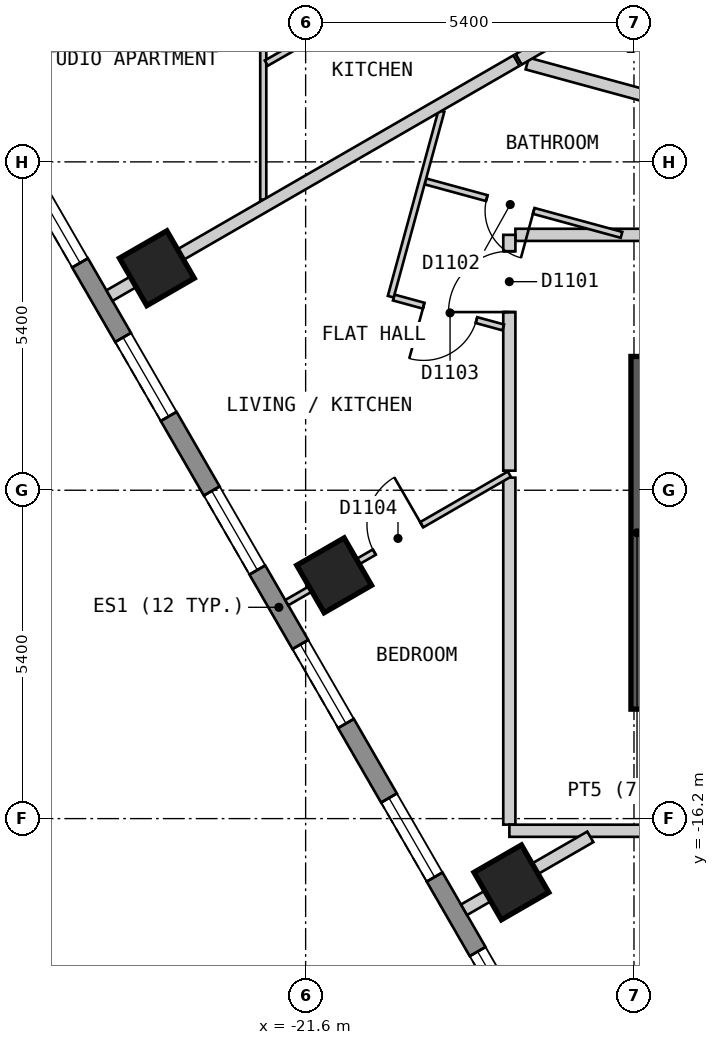
"""IFC4 building model, lengths in metres.
Left out: names, types, materials, properties, quantities, classifications, styles, units other than length and angle.
Written with IfcOpenShell. Run it as: python <this file> out.ifc"""

import sys

from ifc_helpers import new_model, si_unit, direction, frame, frame_2d, origin, origin_2d, place, context, subcontext, project, spatial, polyline, rectangle, outline, extrude, element, fill, save


model = new_model("IFC4")
c1 = context("Model", 3, precision=1e-05, world=origin(), true_north=direction((0.0, 1.0)))
c2 = subcontext(c1, "Body", "Model", "MODEL_VIEW")
j1 = project(units=[si_unit("LENGTHUNIT", "METRE"), si_unit("PLANEANGLEUNIT", "RADIAN")], contexts=[c1])
p1 = place(None, origin())
s1 = spatial("IfcSite", under=j1, at=p1, CompositionType="ELEMENT")
p2 = place(p1, origin())
s2 = spatial("IfcBuilding", under=s1, at=p2, CompositionType="ELEMENT")
p3 = place(p2, frame((0.0, 0.0, 144.6)))
s3 = spatial("IfcBuildingStorey", under=s2, at=p3, CompositionType="ELEMENT", Elevation=144.6)
for number, where, z_axis, x_axis in (
    (1, (-24.047, -7.149, 0.0), (0.0, 0.0, 1.0), (0.5, -0.866, 0.0)),
    (2, (-21.131, -12.199, 0.0), (0.0, 0.0, 1.0), (0.5, -0.866, 0.0)),
    (3, (-18.216, -17.249, 0.0), (0.0, 0.0, 1.0), (0.5, -0.866, 0.0)),
):
    element("IfcColumn", number, at=place(p3, frame(where, z_axis=z_axis, x_axis=x_axis)), inside=s3, PredefinedType="COLUMN", context=c2, shape_type="SweptSolid", body=[
        extrude(rectangle(XDim=0.9, YDim=0.9, at=origin_2d()), origin(), (0.0, 0.0, 1.0), 3.0),
    ])
p4 = place(p3, frame((-28.218, -2.025, 0.0), z_axis=(0.0, 0.0, 1.0), x_axis=(0.500017503135, -0.866015298109, 0.0)))
e4 = element("IfcWall", 4, at=p4, inside=s3, PredefinedType="SOLIDWALL", context=c2, shape_type="SweptSolid", body=[
    extrude(outline(polyline([(0.0, -0.15), (24.711, -0.15), (24.631, 0.15), (0.08, 0.15), (0.0, -0.15)])), origin(), (0.0, 0.0, 1.0), 2.7),
])
p5 = place(p4, frame((1.4, 0.0, 0.15)))
e5 = element("IfcOpeningElement", 5, at=p5, cuts=e4, PredefinedType="OPENING", context=c2, shape_type="SweptSolid", body=[
    extrude(rectangle(XDim=1.5, YDim=2.1, at=frame_2d((0.75, 1.05))), frame((0.0, 0.16, 0.0), z_axis=(0.0, -1.0, 0.0), x_axis=(1.0, 0.0, 0.0)), (0.0, 0.0, 1.0), 0.32),
])
p6 = place(p4, frame((4.316, 0.0, 0.15)))
e6 = element("IfcOpeningElement", 6, at=p6, cuts=e4, PredefinedType="OPENING", context=c2, shape_type="SweptSolid", body=[
    extrude(rectangle(XDim=1.5, YDim=2.1, at=frame_2d((0.75, 1.05))), frame((0.0, 0.16, 0.0), z_axis=(0.0, -1.0, 0.0), x_axis=(1.0, 0.0, 0.0)), (0.0, 0.0, 1.0), 0.32),
])
p7 = place(p4, frame((7.231, 0.0, 0.15)))
e7 = element("IfcOpeningElement", 7, at=p7, cuts=e4, PredefinedType="OPENING", context=c2, shape_type="SweptSolid", body=[
    extrude(rectangle(XDim=1.5, YDim=2.1, at=frame_2d((0.75, 1.05))), frame((0.0, 0.16, 0.0), z_axis=(0.0, -1.0, 0.0), x_axis=(1.0, 0.0, 0.0)), (0.0, 0.0, 1.0), 0.32),
])
p8 = place(p4, frame((10.147, 0.0, 0.15)))
e8 = element("IfcOpeningElement", 8, at=p8, cuts=e4, PredefinedType="OPENING", context=c2, shape_type="SweptSolid", body=[
    extrude(rectangle(XDim=1.5, YDim=2.1, at=frame_2d((0.75, 1.05))), frame((0.0, 0.16, 0.0), z_axis=(0.0, -1.0, 0.0), x_axis=(1.0, 0.0, 0.0)), (0.0, 0.0, 1.0), 0.32),
])
p9 = place(p4, frame((13.062, 0.0, 0.15)))
e9 = element("IfcOpeningElement", 9, at=p9, cuts=e4, PredefinedType="OPENING", context=c2, shape_type="SweptSolid", body=[
    extrude(rectangle(XDim=1.5, YDim=2.1, at=frame_2d((0.75, 1.05))), frame((0.0, 0.16, 0.0), z_axis=(0.0, -1.0, 0.0), x_axis=(1.0, 0.0, 0.0)), (0.0, 0.0, 1.0), 0.32),
])
p10 = place(p4, frame((15.977, 0.0, 0.15)))
e10 = element("IfcOpeningElement", 10, at=p10, cuts=e4, PredefinedType="OPENING", context=c2, shape_type="SweptSolid", body=[
    extrude(rectangle(XDim=1.5, YDim=2.1, at=frame_2d((0.75, 1.05))), frame((0.0, 0.16, 0.0), z_axis=(0.0, -1.0, 0.0), x_axis=(1.0, 0.0, 0.0)), (0.0, 0.0, 1.0), 0.32),
])
p11 = place(p4, frame((18.893, 0.0, 0.15)))
e11 = element("IfcOpeningElement", 11, at=p11, cuts=e4, PredefinedType="OPENING", context=c2, shape_type="SweptSolid", body=[
    extrude(rectangle(XDim=1.5, YDim=2.1, at=frame_2d((0.75, 1.05))), frame((0.0, 0.16, 0.0), z_axis=(0.0, -1.0, 0.0), x_axis=(1.0, 0.0, 0.0)), (0.0, 0.0, 1.0), 0.32),
])
p12 = place(p4, frame((21.809, 0.0, 0.15)))
e12 = element("IfcOpeningElement", 12, at=p12, cuts=e4, PredefinedType="OPENING", context=c2, shape_type="SweptSolid", body=[
    extrude(rectangle(XDim=1.5, YDim=2.1, at=frame_2d((0.75, 1.05))), frame((0.0, 0.16, 0.0), z_axis=(0.0, -1.0, 0.0), x_axis=(1.0, 0.0, 0.0)), (0.0, 0.0, 1.0), 0.32),
])
p13 = place(p3, frame((-18.25, -10.593, 0.0), z_axis=(0.0, 0.0, 1.0), x_axis=(0.0, -1.0, 0.0)))
e13 = element("IfcWall", 13, at=p13, inside=s3, PredefinedType="PARTITIONING", context=c2, shape_type="SweptSolid", body=[
    extrude(rectangle(XDim=5.706, YDim=0.2, at=frame_2d((2.853, 0.0))), origin(), (0.0, 0.0, 1.0), 2.7),
])
p14 = place(p3, frame((-18.15, -6.6, 0.0), z_axis=(0.0, 0.0, 1.0), x_axis=(1.0, 0.0, 0.0)))
e14 = element("IfcWall", 14, at=p14, inside=s3, PredefinedType="PARTITIONING", context=c2, shape_type="SweptSolid", body=[
    extrude(rectangle(XDim=2.55, YDim=0.2, at=frame_2d((1.275, 0.0))), origin(), (0.0, 0.0, 1.0), 2.7),
])
p15 = place(p3, frame((-18.249, -16.4, 0.0), z_axis=(0.0, 0.0, 1.0), x_axis=(1.0, 0.0, 0.0)))
e15 = element("IfcWall", 15, at=p15, inside=s3, PredefinedType="PARTITIONING", context=c2, shape_type="SweptSolid", body=[
    extrude(rectangle(XDim=2.749, YDim=0.2, at=frame_2d((1.375, 0.0))), origin(), (0.0, 0.0, 1.0), 2.7),
])
p16 = place(p3, frame((-18.25, -10.478, 0.0), z_axis=(0.0, 0.0, 1.0), x_axis=(0.0, 1.0, 0.0)))
e16 = element("IfcWall", 16, at=p16, inside=s3, PredefinedType="PARTITIONING", context=c2, shape_type="SweptSolid", body=[
    extrude(rectangle(XDim=3.878, YDim=0.2, at=frame_2d((1.939, 0.0))), origin(), (0.0, 0.0, 1.0), 2.7),
])
p17 = place(p16, frame((2.608, 0.0, 0.0)))
e17 = element("IfcOpeningElement", 17, at=p17, cuts=e16, PredefinedType="OPENING", context=c2, shape_type="SweptSolid", body=[
    extrude(rectangle(XDim=1.0, YDim=2.1, at=frame_2d((0.5, 1.05))), frame((0.0, 0.11, 0.0), z_axis=(0.0, -1.0, 0.0), x_axis=(1.0, 0.0, 0.0)), (0.0, 0.0, 1.0), 0.22),
])
p18 = place(p3, frame((-19.631, -5.721, 0.0), z_axis=(0.0, 0.0, 1.0), x_axis=(0.964816035809, -0.262925877475, 0.0)))
e18 = element("IfcWall", 18, at=p18, inside=s3, PredefinedType="PARTITIONING", context=c2, shape_type="SweptSolid", body=[
    extrude(rectangle(XDim=3.344, YDim=0.1, at=frame_2d((1.672, 0.0))), origin(), (0.0, 0.0, 1.0), 2.7),
])
p19 = place(p18, frame((1.047, 0.0, 0.0)))
e19 = element("IfcOpeningElement", 19, at=p19, cuts=e18, PredefinedType="OPENING", context=c2, shape_type="SweptSolid", body=[
    extrude(rectangle(XDim=0.8, YDim=2.1, at=frame_2d((0.4, 1.05))), frame((0.0, 0.06, 0.0), z_axis=(0.0, -1.0, 0.0), x_axis=(1.0, 0.0, 0.0)), (0.0, 0.0, 1.0), 0.12),
])
p20 = place(p3, frame((-20.151, -7.631, 0.0), z_axis=(0.0, 0.0, 1.0), x_axis=(0.964784947449, -0.263039930765, 0.0)))
e20 = element("IfcWall", 20, at=p20, inside=s3, PredefinedType="PARTITIONING", context=c2, shape_type="SweptSolid", body=[
    extrude(rectangle(XDim=1.866, YDim=0.1, at=frame_2d((0.933, 0.0))), origin(), (0.0, 0.0, 1.0), 2.7),
])
p21 = place(p20, frame((0.51, 0.0, 0.0)))
e21 = element("IfcOpeningElement", 21, at=p21, cuts=e20, PredefinedType="OPENING", context=c2, shape_type="SweptSolid", body=[
    extrude(rectangle(XDim=0.9, YDim=2.1, at=frame_2d((0.45, 1.05))), frame((0.0, 0.06, 0.0), z_axis=(0.0, -1.0, 0.0), x_axis=(1.0, 0.0, 0.0)), (0.0, 0.0, 1.0), 0.12),
])
p22 = place(p3, frame((-20.2, -7.617, 0.0), z_axis=(0.0, 0.0, 1.0), x_axis=(0.263150035392, 0.964754921663, 0.0)))
e22 = element("IfcWall", 22, at=p22, inside=s3, PredefinedType="PARTITIONING", context=c2, shape_type="SweptSolid", body=[
    extrude(rectangle(XDim=3.166, YDim=0.1, at=frame_2d((1.583, 0.0))), origin(), (0.0, 0.0, 1.0), 2.7),
])
p23 = place(p3, frame((-22.297, -6.023, 0.0), z_axis=(0.0, 0.0, 1.0), x_axis=(0.0, 1.0, 0.0)))
e23 = element("IfcWall", 23, at=p23, inside=s3, PredefinedType="PARTITIONING", context=c2, shape_type="SweptSolid", body=[
    extrude(rectangle(XDim=3.47, YDim=0.1, at=frame_2d((1.735, 0.0))), origin(), (0.0, 0.0, 1.0), 2.7),
])
p24 = place(p3, frame((-21.911, -12.649, 0.0), z_axis=(0.0, 0.0, 1.0), x_axis=(0.865984571374, 0.500070717141, 0.0)))
e24 = element("IfcWall", 24, at=p24, inside=s3, PredefinedType="PARTITIONING", context=c2, shape_type="SweptSolid", body=[
    extrude(rectangle(XDim=4.228, YDim=0.1, at=frame_2d((2.114, 0.0))), origin(), (0.0, 0.0, 1.0), 2.7),
])
p25 = place(p24, frame((1.663, 0.0, 0.0)))
e25 = element("IfcOpeningElement", 25, at=p25, cuts=e24, PredefinedType="OPENING", context=c2, shape_type="SweptSolid", body=[
    extrude(rectangle(XDim=0.9, YDim=2.1, at=frame_2d((0.45, 1.05))), frame((0.0, 0.06, 0.0), z_axis=(0.0, -1.0, 0.0), x_axis=(1.0, 0.0, 0.0)), (0.0, 0.0, 1.0), 0.12),
])
p26 = place(p3, frame((-22.247, -3.776, 0.0), z_axis=(0.0, 0.0, 1.0), x_axis=(0.867243093247, 0.497884943752, 0.0)))
e26 = element("IfcWall", 26, at=p26, inside=s3, PredefinedType="PARTITIONING", context=c2, shape_type="SweptSolid", body=[
    extrude(rectangle(XDim=5.854, YDim=0.1, at=frame_2d((2.927, 0.0))), origin(), (0.0, 0.0, 1.0), 2.7),
])
p27 = place(p26, frame((2.498, 0.0, 0.0)))
e27 = element("IfcOpeningElement", 27, at=p27, cuts=e26, PredefinedType="OPENING", context=c2, shape_type="SweptSolid", body=[
    extrude(rectangle(XDim=0.9, YDim=2.1, at=frame_2d((0.45, 1.05))), frame((0.0, 0.06, 0.0), z_axis=(0.0, -1.0, 0.0), x_axis=(1.0, 0.0, 0.0)), (0.0, 0.0, 1.0), 0.12),
])
p28 = place(p3, frame((-17.956, -3.783, 0.0), z_axis=(0.0, 0.0, 1.0), x_axis=(0.964815336827, -0.2629284424, 0.0)))
e28 = element("IfcWall", 28, at=p28, inside=s3, PredefinedType="PARTITIONING", context=c2, shape_type="SweptSolid", body=[
    extrude(rectangle(XDim=2.514, YDim=0.2, at=frame_2d((1.257, 0.0))), origin(), (0.0, 0.0, 1.0), 2.7),
])
p29 = place(p3, frame((-18.995, -17.699, 0.0), z_axis=(0.0, 0.0, 1.0), x_axis=(0.86607371389, 0.499916315105, 0.0)))
e29 = element("IfcWall", 29, at=p29, inside=s3, PredefinedType="PARTITIONING", context=c2, shape_type="SweptSolid", body=[
    extrude(rectangle(XDim=2.398, YDim=0.2, at=frame_2d((1.199, 0.0))), origin(), (0.0, 0.0, 1.0), 2.7),
])
p30 = place(p3, frame((-24.826, -7.599, 0.0), z_axis=(0.0, 0.0, 1.0), x_axis=(0.866031973572, 0.499988620622, 0.0)))
e30 = element("IfcWall", 30, at=p30, inside=s3, PredefinedType="PARTITIONING", context=c2, shape_type="SweptSolid", body=[
    extrude(rectangle(XDim=7.728, YDim=0.2, at=frame_2d((3.864, 0.0))), origin(), (0.0, 0.0, 1.0), 2.7),
])
p31 = place(p3, frame((-18.096, -3.714, 0.0), z_axis=(0.0, 0.0, 1.0), x_axis=(0.865794513859, 0.500399700011, 0.0)))
e31 = element("IfcWall", 31, at=p31, inside=s3, PredefinedType="PARTITIONING", context=c2, shape_type="SweptSolid", body=[
    extrude(rectangle(XDim=2.298, YDim=0.2, at=frame_2d((1.149, 0.0))), origin(), (0.0, 0.0, 1.0), 2.7),
])
p32 = place(p3, frame((-16.15, -14.4, 0.0), z_axis=(0.0, 0.0, 1.0), x_axis=(0.0, 1.0, 0.0)))
e32 = element("IfcWall", 32, at=p32, inside=s3, PredefinedType="SOLIDWALL", context=c2, shape_type="SweptSolid", body=[
    extrude(rectangle(XDim=5.8, YDim=0.2, at=frame_2d((2.9, 0.0))), origin(), (0.0, 0.0, 1.0), 2.7),
])
p33 = place(p6, origin())
e33 = element("IfcWindow", 33, at=p33, inside=s3, PartitioningType="SINGLE_PANEL", PredefinedType="WINDOW", context=c2, shape_type="SweptSolid", body=[
    extrude(rectangle(XDim=1.5, YDim=2.1, at=frame_2d((0.75, 1.05))), frame((0.0, 0.03, 0.0), z_axis=(0.0, -1.0, 0.0), x_axis=(1.0, 0.0, 0.0)), (0.0, 0.0, 1.0), 0.06),
])
fill(e6, e33)
p34 = place(p7, origin())
e34 = element("IfcWindow", 34, at=p34, inside=s3, PartitioningType="SINGLE_PANEL", PredefinedType="WINDOW", context=c2, shape_type="SweptSolid", body=[
    extrude(rectangle(XDim=1.5, YDim=2.1, at=frame_2d((0.75, 1.05))), frame((0.0, 0.03, 0.0), z_axis=(0.0, -1.0, 0.0), x_axis=(1.0, 0.0, 0.0)), (0.0, 0.0, 1.0), 0.06),
])
fill(e7, e34)
p35 = place(p8, origin())
e35 = element("IfcWindow", 35, at=p35, inside=s3, PartitioningType="SINGLE_PANEL", PredefinedType="WINDOW", context=c2, shape_type="SweptSolid", body=[
    extrude(rectangle(XDim=1.5, YDim=2.1, at=frame_2d((0.75, 1.05))), frame((0.0, 0.03, 0.0), z_axis=(0.0, -1.0, 0.0), x_axis=(1.0, 0.0, 0.0)), (0.0, 0.0, 1.0), 0.06),
])
fill(e8, e35)
p36 = place(p9, origin())
e36 = element("IfcWindow", 36, at=p36, inside=s3, PartitioningType="SINGLE_PANEL", PredefinedType="WINDOW", context=c2, shape_type="SweptSolid", body=[
    extrude(rectangle(XDim=1.5, YDim=2.1, at=frame_2d((0.75, 1.05))), frame((0.0, 0.03, 0.0), z_axis=(0.0, -1.0, 0.0), x_axis=(1.0, 0.0, 0.0)), (0.0, 0.0, 1.0), 0.06),
])
fill(e9, e36)
p37 = place(p10, origin())
e37 = element("IfcWindow", 37, at=p37, inside=s3, PartitioningType="SINGLE_PANEL", PredefinedType="WINDOW", context=c2, shape_type="SweptSolid", body=[
    extrude(rectangle(XDim=1.5, YDim=2.1, at=frame_2d((0.75, 1.05))), frame((0.0, 0.03, 0.0), z_axis=(0.0, -1.0, 0.0), x_axis=(1.0, 0.0, 0.0)), (0.0, 0.0, 1.0), 0.06),
])
fill(e10, e37)
p38 = place(p11, origin())
e38 = element("IfcWindow", 38, at=p38, inside=s3, PartitioningType="SINGLE_PANEL", PredefinedType="WINDOW", context=c2, shape_type="SweptSolid", body=[
    extrude(rectangle(XDim=1.5, YDim=2.1, at=frame_2d((0.75, 1.05))), frame((0.0, 0.03, 0.0), z_axis=(0.0, -1.0, 0.0), x_axis=(1.0, 0.0, 0.0)), (0.0, 0.0, 1.0), 0.06),
])
fill(e11, e38)
p39 = place(p17, origin())
e39 = element("IfcDoor", 39, at=p39, inside=s3, OperationType="SINGLE_SWING_LEFT", PredefinedType="DOOR", context=c2, shape_type="SweptSolid", body=[
    extrude(rectangle(XDim=1.0, YDim=2.1, at=frame_2d((0.5, 1.05))), frame((0.0, 0.025, 0.0), z_axis=(0.0, -1.0, 0.0), x_axis=(1.0, 0.0, 0.0)), (0.0, 0.0, 1.0), 0.05),
])
fill(e17, e39)
p40 = place(p19, origin())
e40 = element("IfcDoor", 40, at=p40, inside=s3, OperationType="SINGLE_SWING_RIGHT", PredefinedType="DOOR", context=c2, shape_type="SweptSolid", body=[
    extrude(rectangle(XDim=0.8, YDim=2.1, at=frame_2d((0.4, 1.05))), frame((0.0, 0.025, 0.0), z_axis=(0.0, -1.0, 0.0), x_axis=(1.0, 0.0, 0.0)), (0.0, 0.0, 1.0), 0.05),
])
fill(e19, e40)
p41 = place(p21, origin())
e41 = element("IfcDoor", 41, at=p41, inside=s3, OperationType="SINGLE_SWING_LEFT", PredefinedType="DOOR", context=c2, shape_type="SweptSolid", body=[
    extrude(rectangle(XDim=0.9, YDim=2.1, at=frame_2d((0.45, 1.05))), frame((0.0, 0.025, 0.0), z_axis=(0.0, -1.0, 0.0), x_axis=(1.0, 0.0, 0.0)), (0.0, 0.0, 1.0), 0.05),
])
fill(e21, e41)
p42 = place(p25, origin())
e42 = element("IfcDoor", 42, at=p42, inside=s3, OperationType="SINGLE_SWING_RIGHT", PredefinedType="DOOR", context=c2, shape_type="SweptSolid", body=[
    extrude(rectangle(XDim=0.9, YDim=2.1, at=frame_2d((0.45, 1.05))), frame((0.0, 0.025, 0.0), z_axis=(0.0, -1.0, 0.0), x_axis=(1.0, 0.0, 0.0)), (0.0, 0.0, 1.0), 0.05),
])
fill(e25, e42)
save(model, sys.argv[1])
